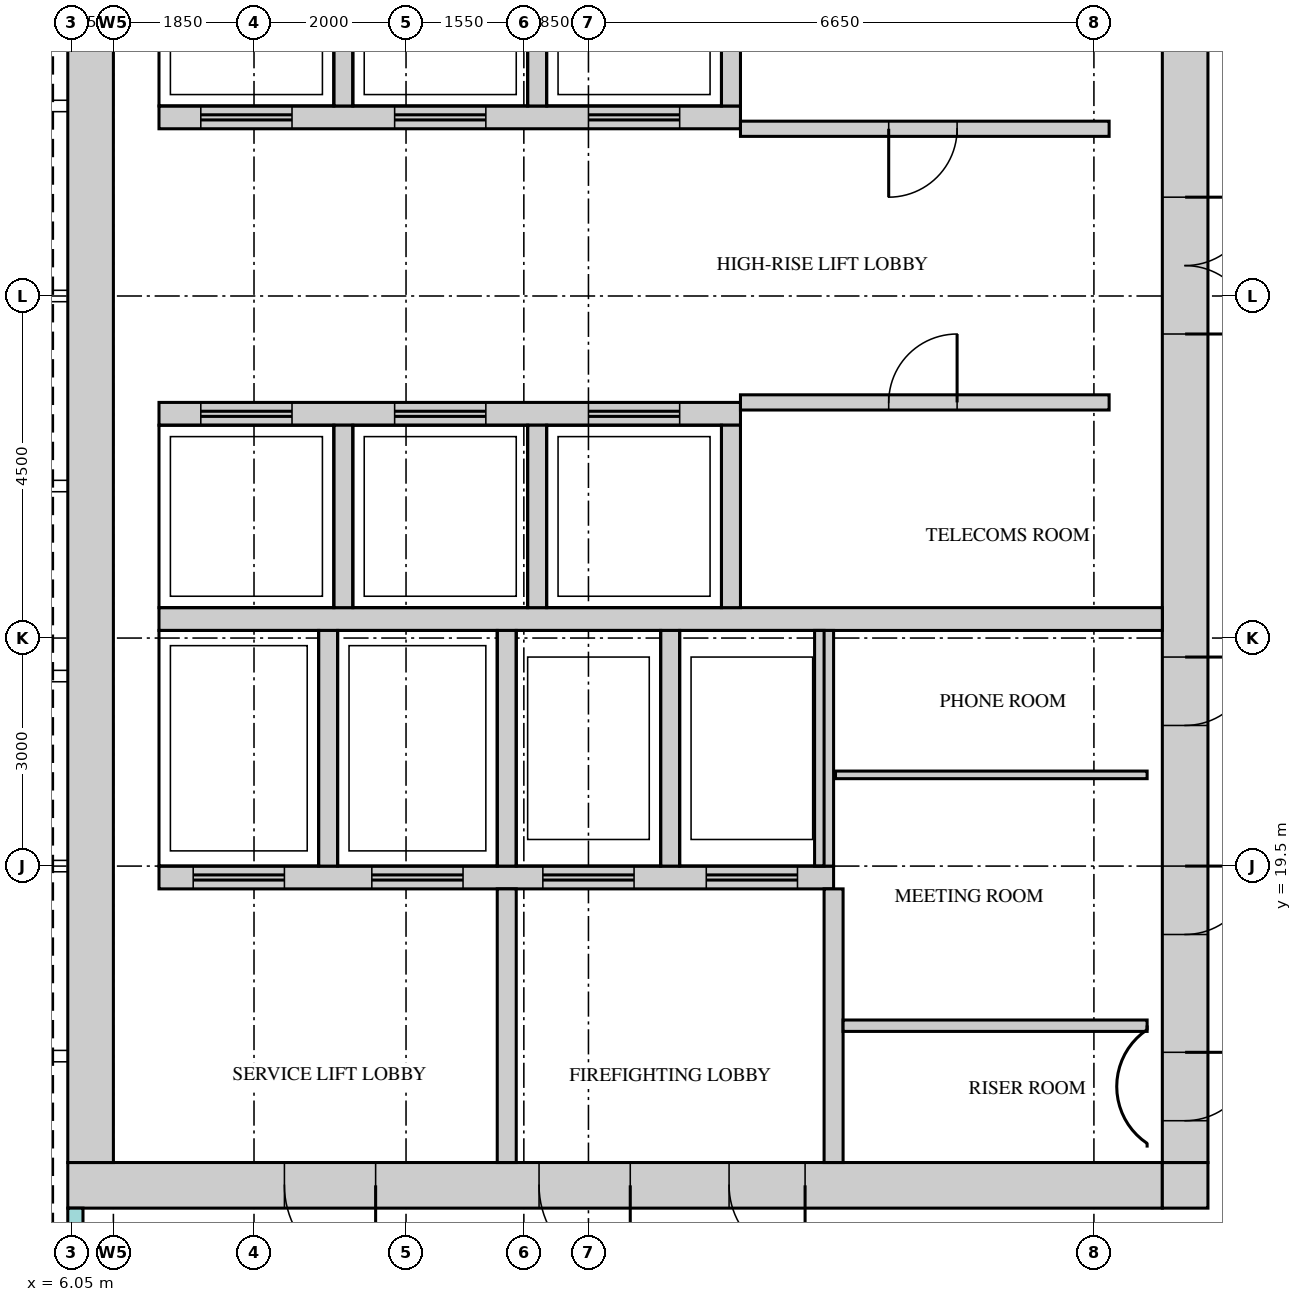
"""IFC4 building model, lengths in metres.
Left out: names, types, materials, properties, quantities, classifications, styles, units other than length and angle.
Written with IfcOpenShell. Run it as: python <this file> out.ifc"""

import sys

from ifc_helpers import new_model, si_unit, direction, frame, frame_2d, origin, place, context, subcontext, project, spatial, rectangle, extrude, source, transform, mapped, element, fill, save


model = new_model("IFC4")
c1 = context("Model", 3, precision=1e-05, world=origin(), true_north=direction((0.0, 1.0)))
c2 = subcontext(c1, "Body", "Model", "MODEL_VIEW")
j1 = project(units=[si_unit("LENGTHUNIT", "METRE"), si_unit("PLANEANGLEUNIT", "RADIAN")], contexts=[c1])
p1 = place(None, origin())
s1 = spatial("IfcSite", under=j1, at=p1, CompositionType="ELEMENT")
p2 = place(p1, origin())
s2 = spatial("IfcBuilding", under=s1, at=p2, CompositionType="ELEMENT")
p3 = place(p2, frame((0.0, 0.0, 306.2)))
s3 = spatial("IfcBuildingStorey", under=s2, at=p3, CompositionType="ELEMENT", Elevation=306.2)
m1 = source(origin(), c2, "Body", "SweptSolid", [
    extrude(rectangle(XDim=14.4, YDim=0.6, at=frame_2d((7.2, 0.0))), origin(), (0.0, 0.0, 1.0), 3.75),
])
p4 = place(p3, frame((6.0, 15.3, 0.0), z_axis=(0.0, 0.0, 1.0), x_axis=(1.0, 0.0, 0.0)))
e1 = element("IfcWall", 1, at=p4, inside=s3, PredefinedType="SHEAR", context=c2, shape_type="MappedRepresentation", body=[
    mapped(m1, transform((0.0, 0.0, 0.0))),
])
m2 = source(origin(), c2, "Body", "SweptSolid", [
    extrude(rectangle(XDim=1.2, YDim=2.1, at=frame_2d((0.6, 1.05))), frame((0.0, 0.31, 0.0), z_axis=(0.0, -1.0, 0.0), x_axis=(1.0, 0.0, 0.0)), (0.0, 0.0, 1.0), 0.62),
])
p5 = place(p4, frame((6.2, 0.0, 0.0)))
e2 = element("IfcOpeningElement", 2, at=p5, cuts=e1, PredefinedType="OPENING", context=c2, shape_type="MappedRepresentation", body=[
    mapped(m2, transform((0.0, 0.0, 0.0))),
])
p6 = place(p4, frame((2.85, 0.0, 0.0)))
e3 = element("IfcOpeningElement", 3, at=p6, cuts=e1, PredefinedType="OPENING", context=c2, shape_type="MappedRepresentation", body=[
    mapped(m2, transform((0.0, 0.0, 0.0))),
])
m3 = source(origin(), c2, "Body", "SweptSolid", [
    extrude(rectangle(XDim=1.0, YDim=2.1, at=frame_2d((0.5, 1.05))), frame((0.0, 0.31, 0.0), z_axis=(0.0, -1.0, 0.0), x_axis=(1.0, 0.0, 0.0)), (0.0, 0.0, 1.0), 0.62),
])
p7 = place(p4, frame((8.7, 0.0, 0.0)))
e4 = element("IfcOpeningElement", 4, at=p7, cuts=e1, PredefinedType="OPENING", context=c2, shape_type="MappedRepresentation", body=[
    mapped(m3, transform((0.0, 0.0, 0.0))),
])
m4 = source(origin(), c2, "Body", "SweptSolid", [
    extrude(rectangle(XDim=0.6, YDim=0.6, at=frame_2d((0.3, 0.0))), origin(), (0.0, 0.0, 1.0), 3.75),
])
p8 = place(p3, frame((20.4, 15.3, 0.0), z_axis=(0.0, 0.0, 1.0), x_axis=(1.0, 0.0, 0.0)))
e5 = element("IfcWall", 5, at=p8, inside=s3, PredefinedType="SHEAR", context=c2, shape_type="MappedRepresentation", body=[
    mapped(m4, transform((0.0, 0.0, 0.0))),
])
m5 = source(origin(), c2, "Body", "SweptSolid", [
    extrude(rectangle(XDim=22.8, YDim=0.6, at=frame_2d((11.4, 0.0))), origin(), (0.0, 0.0, 1.0), 3.75),
])
p9 = place(p3, frame((20.7, 15.6, 0.0), z_axis=(0.0, 0.0, 1.0), x_axis=(0.0, 1.0, 0.0)))
e6 = element("IfcWall", 6, at=p9, inside=s3, PredefinedType="SHEAR", context=c2, shape_type="MappedRepresentation", body=[
    mapped(m5, transform((0.0, 0.0, 0.0))),
])
m6 = source(origin(), c2, "Body", "SweptSolid", [
    extrude(rectangle(XDim=1.8, YDim=2.1, at=frame_2d((0.9, 1.05))), frame((0.0, 0.31, 0.0), z_axis=(0.0, -1.0, 0.0), x_axis=(1.0, 0.0, 0.0)), (0.0, 0.0, 1.0), 0.62),
])
p10 = place(p9, frame((10.9, 0.0, 0.0)))
e7 = element("IfcOpeningElement", 7, at=p10, cuts=e6, PredefinedType="OPENING", context=c2, shape_type="MappedRepresentation", body=[
    mapped(m6, transform((0.0, 0.0, 0.0))),
])
m7 = source(origin(), c2, "Body", "SweptSolid", [
    extrude(rectangle(XDim=0.9, YDim=2.1, at=frame_2d((0.45, 1.05))), frame((0.0, 0.31, 0.0), z_axis=(0.0, -1.0, 0.0), x_axis=(1.0, 0.0, 0.0)), (0.0, 0.0, 1.0), 0.62),
])
p11 = place(p9, frame((0.55, 0.0, 0.0)))
e8 = element("IfcOpeningElement", 8, at=p11, cuts=e6, PredefinedType="OPENING", context=c2, shape_type="MappedRepresentation", body=[
    mapped(m7, transform((0.0, 0.0, 0.0))),
])
p12 = place(p9, frame((3.0, 0.0, 0.0)))
e9 = element("IfcOpeningElement", 9, at=p12, cuts=e6, PredefinedType="OPENING", context=c2, shape_type="MappedRepresentation", body=[
    mapped(m7, transform((0.0, 0.0, 0.0))),
])
p13 = place(p9, frame((5.75, 0.0, 0.0)))
e10 = element("IfcOpeningElement", 10, at=p13, cuts=e6, PredefinedType="OPENING", context=c2, shape_type="MappedRepresentation", body=[
    mapped(m7, transform((0.0, 0.0, 0.0))),
])
p14 = place(p3, frame((6.3, 15.6, 0.0), z_axis=(0.0, 0.0, 1.0), x_axis=(0.0, 1.0, 0.0)))
e11 = element("IfcWall", 11, at=p14, inside=s3, PredefinedType="SHEAR", context=c2, shape_type="MappedRepresentation", body=[
    mapped(m5, transform((0.0, 0.0, 0.0))),
])
m8 = source(origin(), c2, "Body", "SweptSolid", [
    extrude(rectangle(XDim=13.2, YDim=0.3, at=frame_2d((6.6, 0.0))), origin(), (0.0, 0.0, 1.0), 3.75),
])
p15 = place(p3, frame((7.2, 22.75, 0.0), z_axis=(0.0, 0.0, 1.0), x_axis=(1.0, 0.0, 0.0)))
e12 = element("IfcWall", 12, at=p15, inside=s3, PredefinedType="STANDARD", context=c2, shape_type="MappedRepresentation", body=[
    mapped(m8, transform((0.0, 0.0, 0.0))),
])
m9 = source(origin(), c2, "Body", "SweptSolid", [
    extrude(rectangle(XDim=8.875, YDim=0.3, at=frame_2d((4.438, 0.0))), origin(), (0.0, 0.0, 1.0), 3.75),
])
p16 = place(p3, frame((7.2, 19.35, 0.0), z_axis=(0.0, 0.0, 1.0), x_axis=(1.0, 0.0, 0.0)))
e13 = element("IfcWall", 13, at=p16, inside=s3, PredefinedType="STANDARD", context=c2, shape_type="MappedRepresentation", body=[
    mapped(m9, transform((0.0, 0.0, 0.0))),
])
m10 = source(origin(), c2, "Body", "SweptSolid", [
    extrude(rectangle(XDim=1.2, YDim=2.1, at=frame_2d((0.6, 1.05))), frame((0.0, 0.16, 0.0), z_axis=(0.0, -1.0, 0.0), x_axis=(1.0, 0.0, 0.0)), (0.0, 0.0, 1.0), 0.32),
])
p17 = place(p16, frame((0.45, 0.0, 0.0)))
e14 = element("IfcOpeningElement", 14, at=p17, cuts=e13, PredefinedType="OPENING", context=c2, shape_type="MappedRepresentation", body=[
    mapped(m10, transform((0.0, 0.0, 0.0))),
])
p18 = place(p16, frame((2.8, 0.0, 0.0)))
e15 = element("IfcOpeningElement", 15, at=p18, cuts=e13, PredefinedType="OPENING", context=c2, shape_type="MappedRepresentation", body=[
    mapped(m10, transform((0.0, 0.0, 0.0))),
])
p19 = place(p16, frame((5.05, 0.0, 0.0)))
e16 = element("IfcOpeningElement", 16, at=p19, cuts=e13, PredefinedType="OPENING", context=c2, shape_type="MappedRepresentation", body=[
    mapped(m10, transform((0.0, 0.0, 0.0))),
])
p20 = place(p16, frame((7.2, 0.0, 0.0)))
e17 = element("IfcOpeningElement", 17, at=p20, cuts=e13, PredefinedType="OPENING", context=c2, shape_type="MappedRepresentation", body=[
    mapped(m10, transform((0.0, 0.0, 0.0))),
])
m11 = source(origin(), c2, "Body", "SweptSolid", [
    extrude(rectangle(XDim=7.65, YDim=0.3, at=frame_2d((3.825, 0.0))), origin(), (0.0, 0.0, 1.0), 3.75),
])
p21 = place(p3, frame((7.2, 29.35, 0.0), z_axis=(0.0, 0.0, 1.0), x_axis=(1.0, 0.0, 0.0)))
e18 = element("IfcWall", 18, at=p21, inside=s3, PredefinedType="STANDARD", context=c2, shape_type="MappedRepresentation", body=[
    mapped(m11, transform((0.0, 0.0, 0.0))),
])
p22 = place(p21, frame((0.55, 0.0, 0.0)))
e19 = element("IfcOpeningElement", 19, at=p22, cuts=e18, PredefinedType="OPENING", context=c2, shape_type="MappedRepresentation", body=[
    mapped(m10, transform((0.0, 0.0, 0.0))),
])
p23 = place(p21, frame((3.1, 0.0, 0.0)))
e20 = element("IfcOpeningElement", 20, at=p23, cuts=e18, PredefinedType="OPENING", context=c2, shape_type="MappedRepresentation", body=[
    mapped(m10, transform((0.0, 0.0, 0.0))),
])
p24 = place(p21, frame((5.65, 0.0, 0.0)))
e21 = element("IfcOpeningElement", 21, at=p24, cuts=e18, PredefinedType="OPENING", context=c2, shape_type="MappedRepresentation", body=[
    mapped(m10, transform((0.0, 0.0, 0.0))),
])
p25 = place(p3, frame((7.2, 25.45, 0.0), z_axis=(0.0, 0.0, 1.0), x_axis=(1.0, 0.0, 0.0)))
e22 = element("IfcWall", 22, at=p25, inside=s3, PredefinedType="STANDARD", context=c2, shape_type="MappedRepresentation", body=[
    mapped(m11, transform((0.0, 0.0, 0.0))),
])
p26 = place(p25, frame((0.55, 0.0, 0.0)))
e23 = element("IfcOpeningElement", 23, at=p26, cuts=e22, PredefinedType="OPENING", context=c2, shape_type="MappedRepresentation", body=[
    mapped(m10, transform((0.0, 0.0, 0.0))),
])
p27 = place(p25, frame((3.1, 0.0, 0.0)))
e24 = element("IfcOpeningElement", 24, at=p27, cuts=e22, PredefinedType="OPENING", context=c2, shape_type="MappedRepresentation", body=[
    mapped(m10, transform((0.0, 0.0, 0.0))),
])
p28 = place(p25, frame((5.65, 0.0, 0.0)))
e25 = element("IfcOpeningElement", 25, at=p28, cuts=e22, PredefinedType="OPENING", context=c2, shape_type="MappedRepresentation", body=[
    mapped(m10, transform((0.0, 0.0, 0.0))),
])
m12 = source(origin(), c2, "Body", "SweptSolid", [
    extrude(rectangle(XDim=3.1, YDim=0.25, at=frame_2d((1.55, 0.0))), origin(), (0.0, 0.0, 1.0), 3.75),
])
for number, where, z_axis, x_axis in (
    (26, (9.425, 19.5, 0.0), (0.0, 0.0, 1.0), (0.0, 1.0, 0.0)),
    (27, (11.775, 19.5, 0.0), (0.0, 0.0, 1.0), (0.0, 1.0, 0.0)),
    (28, (13.925, 19.5, 0.0), (0.0, 0.0, 1.0), (0.0, 1.0, 0.0)),
    (29, (15.95, 19.5, 0.0), (0.0, 0.0, 1.0), (0.0, 1.0, 0.0)),
):
    element("IfcWall", number, at=place(p3, frame(where, z_axis=z_axis, x_axis=x_axis)), inside=s3, PredefinedType="STANDARD", context=c2, shape_type="MappedRepresentation", body=[
        mapped(m12, transform((0.0, 0.0, 0.0))),
    ])
m13 = source(origin(), c2, "Body", "SweptSolid", [
    extrude(rectangle(XDim=2.4, YDim=0.25, at=frame_2d((1.2, 0.0))), origin(), (0.0, 0.0, 1.0), 3.75),
])
for number, where, z_axis, x_axis in (
    (30, (9.625, 29.5, 0.0), (0.0, 0.0, 1.0), (0.0, 1.0, 0.0)),
    (31, (12.175, 29.5, 0.0), (0.0, 0.0, 1.0), (0.0, 1.0, 0.0)),
    (32, (14.725, 29.5, 0.0), (0.0, 0.0, 1.0), (0.0, 1.0, 0.0)),
):
    element("IfcWall", number, at=place(p3, frame(where, z_axis=z_axis, x_axis=x_axis)), inside=s3, PredefinedType="STANDARD", context=c2, shape_type="MappedRepresentation", body=[
        mapped(m13, transform((0.0, 0.0, 0.0))),
    ])
m14 = source(origin(), c2, "Body", "SweptSolid", [
    extrude(rectangle(XDim=2.4, YDim=0.25, at=frame_2d((1.2, 0.0))), origin(), (0.0, 0.0, 1.0), 3.75),
])
for number, where, z_axis, x_axis in (
    (33, (9.625, 22.9, 0.0), (0.0, 0.0, 1.0), (0.0, 1.0, 0.0)),
    (34, (12.175, 22.9, 0.0), (0.0, 0.0, 1.0), (0.0, 1.0, 0.0)),
    (35, (14.725, 22.9, 0.0), (0.0, 0.0, 1.0), (0.0, 1.0, 0.0)),
):
    element("IfcWall", number, at=place(p3, frame(where, z_axis=z_axis, x_axis=x_axis)), inside=s3, PredefinedType="STANDARD", context=c2, shape_type="MappedRepresentation", body=[
        mapped(m14, transform((0.0, 0.0, 0.0))),
    ])
m15 = source(origin(), c2, "Body", "SweptSolid", [
    extrude(rectangle(XDim=3.6, YDim=0.25, at=frame_2d((1.8, 0.0))), origin(), (0.0, 0.0, 1.0), 3.75),
])
for number, where, z_axis, x_axis in (
    (36, (16.075, 15.6, 0.0), (0.0, 0.0, 1.0), (0.0, 1.0, 0.0)),
    (37, (11.775, 15.6, 0.0), (0.0, 0.0, 1.0), (0.0, 1.0, 0.0)),
):
    element("IfcWall", number, at=place(p3, frame(where, z_axis=z_axis, x_axis=x_axis)), inside=s3, PredefinedType="STANDARD", context=c2, shape_type="MappedRepresentation", body=[
        mapped(m15, transform((0.0, 0.0, 0.0))),
    ])
m16 = source(origin(), c2, "Body", "SweptSolid", [
    extrude(rectangle(XDim=4.0, YDim=0.15, at=frame_2d((2.0, 0.0))), origin(), (0.0, 0.0, 1.0), 3.8),
])
p29 = place(p3, frame((16.2, 17.4, 0.0), z_axis=(0.0, 0.0, 1.0), x_axis=(1.0, 0.0, 0.0)))
e38 = element("IfcWall", 38, at=p29, inside=s3, PredefinedType="PARTITIONING", context=c2, shape_type="MappedRepresentation", body=[
    mapped(m16, transform((0.0, 0.0, 0.0))),
])
m17 = source(origin(), c2, "Body", "SweptSolid", [
    extrude(rectangle(XDim=4.1, YDim=0.1, at=frame_2d((2.05, 0.0))), origin(), (0.0, 0.0, 1.0), 3.8),
])
p30 = place(p3, frame((16.1, 20.7, 0.0), z_axis=(0.0, 0.0, 1.0), x_axis=(1.0, 0.0, 0.0)))
e39 = element("IfcWall", 39, at=p30, inside=s3, PredefinedType="PARTITIONING", context=c2, shape_type="MappedRepresentation", body=[
    mapped(m17, transform((0.0, 0.0, 0.0))),
])
m18 = source(origin(), c2, "Body", "SweptSolid", [
    extrude(rectangle(XDim=4.85, YDim=0.2, at=frame_2d((2.425, 0.0))), origin(), (0.0, 0.0, 1.0), 3.8),
])
p31 = place(p3, frame((14.85, 25.6, 0.0), z_axis=(0.0, 0.0, 1.0), x_axis=(1.0, 0.0, 0.0)))
e40 = element("IfcWall", 40, at=p31, inside=s3, PredefinedType="PARTITIONING", context=c2, shape_type="MappedRepresentation", body=[
    mapped(m18, transform((0.0, 0.0, 0.0))),
])
m19 = source(origin(), c2, "Body", "SweptSolid", [
    extrude(rectangle(XDim=0.9, YDim=2.1, at=frame_2d((0.45, 1.05))), frame((0.0, 0.11, 0.0), z_axis=(0.0, -1.0, 0.0), x_axis=(1.0, 0.0, 0.0)), (0.0, 0.0, 1.0), 0.22),
])
p32 = place(p31, frame((1.95, 0.0, 0.0)))
e41 = element("IfcOpeningElement", 41, at=p32, cuts=e40, PredefinedType="OPENING", context=c2, shape_type="MappedRepresentation", body=[
    mapped(m19, transform((0.0, 0.0, 0.0))),
])
p33 = place(p3, frame((14.85, 29.2, 0.0), z_axis=(0.0, 0.0, 1.0), x_axis=(1.0, 0.0, 0.0)))
e42 = element("IfcWall", 42, at=p33, inside=s3, PredefinedType="PARTITIONING", context=c2, shape_type="MappedRepresentation", body=[
    mapped(m18, transform((0.0, 0.0, 0.0))),
])
p34 = place(p33, frame((1.95, 0.0, 0.0)))
e43 = element("IfcOpeningElement", 43, at=p34, cuts=e42, PredefinedType="OPENING", context=c2, shape_type="MappedRepresentation", body=[
    mapped(m19, transform((0.0, 0.0, 0.0))),
])
m20 = source(origin(), c2, "Body", "SweptSolid", [
    extrude(rectangle(XDim=0.9, YDim=2.1, at=frame_2d((0.45, 1.05))), frame((0.0, 0.025, 0.0), z_axis=(0.0, -1.0, 0.0), x_axis=(1.0, 0.0, 0.0)), (0.0, 0.0, 1.0), 0.05),
])
p35 = place(p32, origin())
e44 = element("IfcDoor", 44, at=p35, inside=s3, OperationType="SINGLE_SWING_LEFT", PredefinedType="DOOR", context=c2, shape_type="MappedRepresentation", body=[
    mapped(m20, transform((0.0, 0.0, 0.0))),
])
fill(e41, e44)
p36 = place(p34, origin())
e45 = element("IfcDoor", 45, at=p36, inside=s3, OperationType="SINGLE_SWING_LEFT", PredefinedType="DOOR", context=c2, shape_type="MappedRepresentation", body=[
    mapped(m20, transform((0.0, 0.0, 0.0))),
])
fill(e43, e45)
m21 = source(origin(), c2, "Body", "SweptSolid", [
    extrude(rectangle(XDim=1.8, YDim=2.1, at=frame_2d((0.9, 1.05))), frame((0.0, 0.25, 0.0), z_axis=(0.0, -1.0, 0.0), x_axis=(1.0, 0.0, 0.0)), (0.0, 0.0, 1.0), 0.5),
])
p37 = place(p10, origin())
e46 = element("IfcDoor", 46, at=p37, inside=s3, OperationType="DOUBLE_DOOR_SINGLE_SWING", PredefinedType="DOOR", context=c2, shape_type="MappedRepresentation", body=[
    mapped(m21, transform((0.0, 0.0, 0.0))),
])
fill(e7, e46)
m22 = source(origin(), c2, "Body", "SweptSolid", [
    extrude(rectangle(XDim=0.9, YDim=2.1, at=frame_2d((0.45, 1.05))), frame((0.0, 0.25, 0.0), z_axis=(0.0, -1.0, 0.0), x_axis=(1.0, 0.0, 0.0)), (0.0, 0.0, 1.0), 0.5),
])
p38 = place(p11, origin())
e47 = element("IfcDoor", 47, at=p38, inside=s3, OperationType="SINGLE_SWING_RIGHT", PredefinedType="DOOR", context=c2, shape_type="MappedRepresentation", body=[
    mapped(m22, transform((0.0, 0.0, 0.0))),
])
fill(e8, e47)
p39 = place(p12, origin())
e48 = element("IfcDoor", 48, at=p39, inside=s3, OperationType="SINGLE_SWING_RIGHT", PredefinedType="DOOR", context=c2, shape_type="MappedRepresentation", body=[
    mapped(m22, transform((0.0, 0.0, 0.0))),
])
fill(e9, e48)
p40 = place(p13, origin())
e49 = element("IfcDoor", 49, at=p40, inside=s3, OperationType="SINGLE_SWING_RIGHT", PredefinedType="DOOR", context=c2, shape_type="MappedRepresentation", body=[
    mapped(m22, transform((0.0, 0.0, 0.0))),
])
fill(e10, e49)
m23 = source(origin(), c2, "Body", "SweptSolid", [
    extrude(rectangle(XDim=1.2, YDim=2.1, at=frame_2d((0.6, 1.05))), frame((0.0, 0.25, 0.0), z_axis=(0.0, -1.0, 0.0), x_axis=(1.0, 0.0, 0.0)), (0.0, 0.0, 1.0), 0.5),
])
p41 = place(p5, origin())
e50 = element("IfcDoor", 50, at=p41, inside=s3, OperationType="SINGLE_SWING_RIGHT", PredefinedType="DOOR", context=c2, shape_type="MappedRepresentation", body=[
    mapped(m23, transform((0.0, 0.0, 0.0))),
])
fill(e2, e50)
p42 = place(p6, origin())
e51 = element("IfcDoor", 51, at=p42, inside=s3, OperationType="SINGLE_SWING_RIGHT", PredefinedType="DOOR", context=c2, shape_type="MappedRepresentation", body=[
    mapped(m23, transform((0.0, 0.0, 0.0))),
])
fill(e3, e51)
m24 = source(origin(), c2, "Body", "SweptSolid", [
    extrude(rectangle(XDim=1.0, YDim=2.1, at=frame_2d((0.5, 1.05))), frame((0.0, 0.25, 0.0), z_axis=(0.0, -1.0, 0.0), x_axis=(1.0, 0.0, 0.0)), (0.0, 0.0, 1.0), 0.5),
])
p43 = place(p7, origin())
e52 = element("IfcDoor", 52, at=p43, inside=s3, OperationType="SINGLE_SWING_RIGHT", PredefinedType="DOOR", context=c2, shape_type="MappedRepresentation", body=[
    mapped(m24, transform((0.0, 0.0, 0.0))),
])
fill(e4, e52)
m25 = source(origin(), c2, "Body", "SweptSolid", [
    extrude(rectangle(XDim=1.2, YDim=2.1, at=frame_2d((0.6, 1.05))), frame((0.0, 0.025, 0.0), z_axis=(0.0, -1.0, 0.0), x_axis=(1.0, 0.0, 0.0)), (0.0, 0.0, 1.0), 0.05),
])
p44 = place(p26, origin())
e53 = element("IfcDoor", 53, at=p44, inside=s3, OperationType="DOUBLE_DOOR_SLIDING", PredefinedType="DOOR", context=c2, shape_type="MappedRepresentation", body=[
    mapped(m25, transform((0.0, 0.0, 0.0))),
])
fill(e23, e53)
p45 = place(p27, origin())
e54 = element("IfcDoor", 54, at=p45, inside=s3, OperationType="DOUBLE_DOOR_SLIDING", PredefinedType="DOOR", context=c2, shape_type="MappedRepresentation", body=[
    mapped(m25, transform((0.0, 0.0, 0.0))),
])
fill(e24, e54)
p46 = place(p28, origin())
e55 = element("IfcDoor", 55, at=p46, inside=s3, OperationType="DOUBLE_DOOR_SLIDING", PredefinedType="DOOR", context=c2, shape_type="MappedRepresentation", body=[
    mapped(m25, transform((0.0, 0.0, 0.0))),
])
fill(e25, e55)
p47 = place(p22, origin())
e56 = element("IfcDoor", 56, at=p47, inside=s3, OperationType="DOUBLE_DOOR_SLIDING", PredefinedType="DOOR", context=c2, shape_type="MappedRepresentation", body=[
    mapped(m25, transform((0.0, 0.0, 0.0))),
])
fill(e19, e56)
p48 = place(p23, origin())
e57 = element("IfcDoor", 57, at=p48, inside=s3, OperationType="DOUBLE_DOOR_SLIDING", PredefinedType="DOOR", context=c2, shape_type="MappedRepresentation", body=[
    mapped(m25, transform((0.0, 0.0, 0.0))),
])
fill(e20, e57)
p49 = place(p24, origin())
e58 = element("IfcDoor", 58, at=p49, inside=s3, OperationType="DOUBLE_DOOR_SLIDING", PredefinedType="DOOR", context=c2, shape_type="MappedRepresentation", body=[
    mapped(m25, transform((0.0, 0.0, 0.0))),
])
fill(e21, e58)
p50 = place(p17, origin())
e59 = element("IfcDoor", 59, at=p50, inside=s3, OperationType="DOUBLE_DOOR_SLIDING", PredefinedType="DOOR", context=c2, shape_type="MappedRepresentation", body=[
    mapped(m25, transform((0.0, 0.0, 0.0))),
])
fill(e14, e59)
p51 = place(p18, origin())
e60 = element("IfcDoor", 60, at=p51, inside=s3, OperationType="DOUBLE_DOOR_SLIDING", PredefinedType="DOOR", context=c2, shape_type="MappedRepresentation", body=[
    mapped(m25, transform((0.0, 0.0, 0.0))),
])
fill(e15, e60)
p52 = place(p19, origin())
e61 = element("IfcDoor", 61, at=p52, inside=s3, OperationType="DOUBLE_DOOR_SLIDING", PredefinedType="DOOR", context=c2, shape_type="MappedRepresentation", body=[
    mapped(m25, transform((0.0, 0.0, 0.0))),
])
fill(e16, e61)
p53 = place(p20, origin())
e62 = element("IfcDoor", 62, at=p53, inside=s3, OperationType="DOUBLE_DOOR_SLIDING", PredefinedType="DOOR", context=c2, shape_type="MappedRepresentation", body=[
    mapped(m25, transform((0.0, 0.0, 0.0))),
])
fill(e17, e62)
save(model, sys.argv[1])
